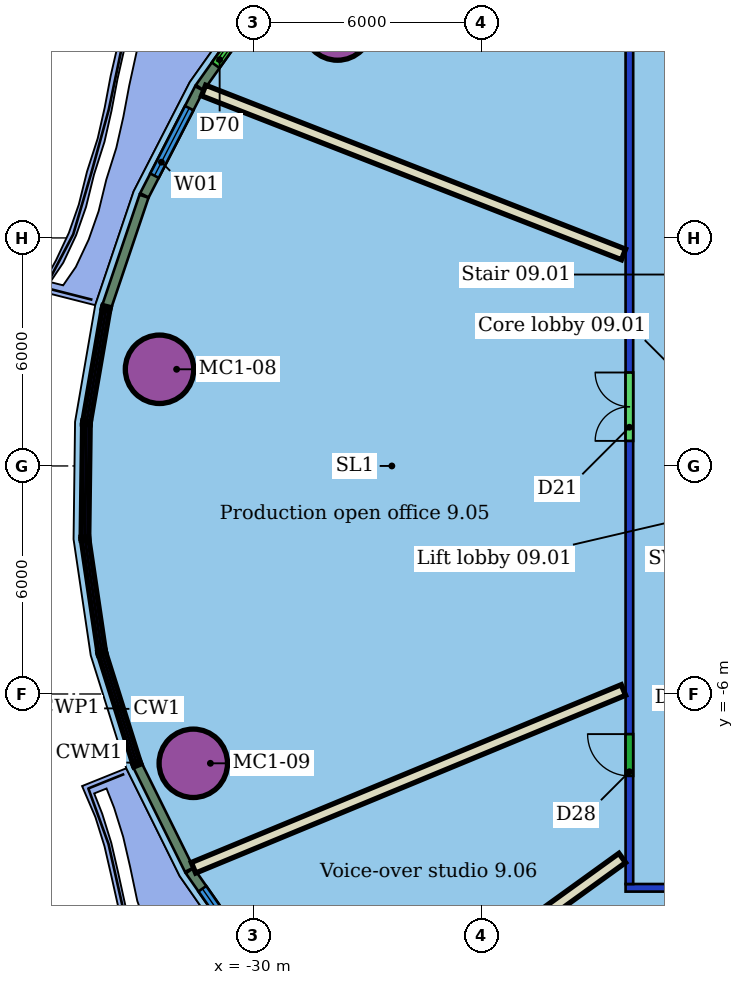
"""IFC4 building model, lengths in metres.
Left out: names, types, materials, properties, quantities, classifications, styles, units other than length and angle.
Written with IfcOpenShell. Run it as: python <this file> out.ifc"""

import sys

from ifc_helpers import new_model, si_unit, direction, frame, frame_2d, origin, origin_2d, place, context, subcontext, project, spatial, rectangle, hollow_circle, extrude, element, fill, save


model = new_model("IFC4")
c1 = context("Model", 3, precision=1e-05, world=origin(), true_north=direction((0.0, 1.0)))
c2 = subcontext(c1, "Body", "Model", "MODEL_VIEW")
j1 = project(units=[si_unit("LENGTHUNIT", "METRE"), si_unit("PLANEANGLEUNIT", "RADIAN")], contexts=[c1])
p1 = place(None, origin())
s1 = spatial("IfcSite", under=j1, at=p1, CompositionType="ELEMENT")
p2 = place(p1, origin())
s2 = spatial("IfcBuilding", under=s1, at=p2, CompositionType="ELEMENT")
p3 = place(p2, frame((0.0, 0.0, 50.8)))
s3 = spatial("IfcBuildingStorey", under=s2, at=p3, CompositionType="ELEMENT", Elevation=50.8)
for number, where, z_axis, x_axis in (
    (1, (-27.78, 11.576, 0.0), (0.0, 0.0, 1.0), (1.0, 0.0, 0.0)),
    (2, (-32.464, 2.543, 0.0), (0.0, 0.0, 1.0), (1.0, 0.0, 0.0)),
    (3, (-31.575, -7.824, 0.0), (0.0, 0.0, 1.0), (1.0, 0.0, 0.0)),
):
    element("IfcColumn", number, at=place(p3, frame(where, z_axis=z_axis, x_axis=x_axis)), inside=s3, PredefinedType="COLUMN", context=c2, shape_type="SweptSolid", body=[
        extrude(hollow_circle(Radius=0.9, WallThickness=0.06, at=origin_2d()), origin(), (0.0, 0.0, 1.0), 3.55),
    ])
p4 = place(p3, frame((8.2, -11.1, 0.0), z_axis=(0.0, 0.0, 1.0), x_axis=(-1.0, 0.0, 0.0)))
e4 = element("IfcWall", 4, at=p4, inside=s3, PredefinedType="PARTITIONING", context=c2, shape_type="SweptSolid", body=[
    extrude(rectangle(XDim=28.4, YDim=0.2, at=frame_2d((14.2, 0.0))), origin(), (0.0, 0.0, 1.0), 2.85),
])
p5 = place(p4, frame((24.814, 0.0, 0.0)))
e5 = element("IfcOpeningElement", 5, at=p5, cuts=e4, PredefinedType="OPENING", context=c2, shape_type="SweptSolid", body=[
    extrude(rectangle(XDim=1.0, YDim=2.1, at=frame_2d((0.5, 1.05))), frame((0.0, 0.11, 0.0), z_axis=(0.0, -1.0, 0.0), x_axis=(1.0, 0.0, 0.0)), (0.0, 0.0, 1.0), 0.22),
])
p6 = place(p4, frame((18.447, 0.0, 0.0)))
e6 = element("IfcOpeningElement", 6, at=p6, cuts=e4, PredefinedType="OPENING", context=c2, shape_type="SweptSolid", body=[
    extrude(rectangle(XDim=1.8, YDim=2.1, at=frame_2d((0.9, 1.05))), frame((0.0, 0.11, 0.0), z_axis=(0.0, -1.0, 0.0), x_axis=(1.0, 0.0, 0.0)), (0.0, 0.0, 1.0), 0.22),
])
p7 = place(p4, frame((7.966, 0.0, 0.0)))
e7 = element("IfcOpeningElement", 7, at=p7, cuts=e4, PredefinedType="OPENING", context=c2, shape_type="SweptSolid", body=[
    extrude(rectangle(XDim=0.9, YDim=2.1, at=frame_2d((0.45, 1.05))), frame((0.0, 0.11, 0.0), z_axis=(0.0, -1.0, 0.0), x_axis=(1.0, 0.0, 0.0)), (0.0, 0.0, 1.0), 0.22),
])
p8 = place(p3, frame((-20.1, -11.0, 0.0), z_axis=(0.0, 0.0, 1.0), x_axis=(0.0, 1.0, 0.0)))
e8 = element("IfcWall", 8, at=p8, inside=s3, PredefinedType="PARTITIONING", context=c2, shape_type="SweptSolid", body=[
    extrude(rectangle(XDim=22.0, YDim=0.2, at=frame_2d((11.0, 0.0))), origin(), (0.0, 0.0, 1.0), 2.85),
])
p9 = place(p8, frame((11.659, 0.0, 0.0)))
e9 = element("IfcOpeningElement", 9, at=p9, cuts=e8, PredefinedType="OPENING", context=c2, shape_type="SweptSolid", body=[
    extrude(rectangle(XDim=1.8, YDim=2.1, at=frame_2d((0.9, 1.05))), frame((0.0, 0.11, 0.0), z_axis=(0.0, -1.0, 0.0), x_axis=(1.0, 0.0, 0.0)), (0.0, 0.0, 1.0), 0.22),
])
p10 = place(p8, frame((2.844, 0.0, 0.0)))
e10 = element("IfcOpeningElement", 10, at=p10, cuts=e8, PredefinedType="OPENING", context=c2, shape_type="SweptSolid", body=[
    extrude(rectangle(XDim=1.1, YDim=2.1, at=frame_2d((0.55, 1.05))), frame((0.0, 0.11, 0.0), z_axis=(0.0, -1.0, 0.0), x_axis=(1.0, 0.0, 0.0)), (0.0, 0.0, 1.0), 0.22),
])
p11 = place(p3, frame((-31.304, 9.879, 0.0), z_axis=(0.0, 0.0, 1.0), x_axis=(0.931524907104, -0.363677532225, 0.0)))
e11 = element("IfcWall", 11, at=p11, inside=s3, PredefinedType="PARTITIONING", context=c2, shape_type="SweptSolid", body=[
    extrude(rectangle(XDim=11.862, YDim=0.3, at=frame_2d((5.931, 0.0))), origin(), (0.0, 0.0, 1.0), 3.55),
])
p12 = place(p3, frame((-31.569, -10.573, 0.0), z_axis=(0.0, 0.0, 1.0), x_axis=(0.924113266053, 0.382118661551, 0.0)))
e12 = element("IfcWall", 12, at=p12, inside=s3, PredefinedType="PARTITIONING", context=c2, shape_type="SweptSolid", body=[
    extrude(rectangle(XDim=12.241, YDim=0.3, at=frame_2d((6.121, 0.0))), origin(), (0.0, 0.0, 1.0), 3.55),
])
p13 = place(p3, frame((-27.538, -15.549, 0.0), z_axis=(0.0, 0.0, 1.0), x_axis=(0.810780725644, 0.585349993528, 0.0)))
e13 = element("IfcWall", 13, at=p13, inside=s3, PredefinedType="PARTITIONING", context=c2, shape_type="SweptSolid", body=[
    extrude(rectangle(XDim=8.942, YDim=0.3, at=frame_2d((4.471, 0.0))), origin(), (0.0, 0.0, 1.0), 3.55),
])
p14 = place(p3, frame((-22.032, -19.475, 0.0), z_axis=(0.0, 0.0, 1.0), x_axis=(0.635562171799, 0.772049691262, 0.0)))
e14 = element("IfcWall", 14, at=p14, inside=s3, PredefinedType="PARTITIONING", context=c2, shape_type="SweptSolid", body=[
    extrude(rectangle(XDim=10.677, YDim=0.1, at=frame_2d((5.338, 0.0))), origin(), (0.0, 0.0, 1.0), 3.55),
])
p15 = place(p3, frame((-29.527, 12.6, 0.0), z_axis=(0.0, 0.0, 1.0), x_axis=(-0.578643660536, -0.81558047679, 0.0)))
e15 = element("IfcWall", 15, at=p15, inside=s3, PredefinedType="SOLIDWALL", context=c2, shape_type="SweptSolid", body=[
    extrude(rectangle(XDim=3.244, YDim=0.25, at=frame_2d((1.622, 0.0))), origin(), (0.0, 0.0, 1.0), 3.15),
])
p16 = place(p15, frame((0.722, 0.0, 0.0)))
e16 = element("IfcOpeningElement", 16, at=p16, cuts=e15, PredefinedType="OPENING", context=c2, shape_type="SweptSolid", body=[
    extrude(rectangle(XDim=1.8, YDim=2.4, at=frame_2d((0.9, 1.2))), frame((0.0, 0.135, 0.0), z_axis=(0.0, -1.0, 0.0), x_axis=(1.0, 0.0, 0.0)), (0.0, 0.0, 1.0), 0.27),
])
p17 = place(p3, frame((-31.417, 9.932, 0.0), z_axis=(0.0, 0.0, 1.0), x_axis=(-0.457105364661, -0.889412550844, 0.0)))
e17 = element("IfcWall", 17, at=p17, inside=s3, PredefinedType="SOLIDWALL", context=c2, shape_type="SweptSolid", body=[
    extrude(rectangle(XDim=3.16, YDim=0.25, at=frame_2d((1.58, 0.0))), origin(), (0.0, 0.0, 1.0), 3.15),
])
p18 = place(p17, frame((0.58, 0.0, 0.8)))
e18 = element("IfcOpeningElement", 18, at=p18, cuts=e17, PredefinedType="OPENING", context=c2, shape_type="SweptSolid", body=[
    extrude(rectangle(XDim=2.0, YDim=2.2, at=frame_2d((1.0, 1.1))), frame((0.0, 0.135, 0.0), z_axis=(0.0, -1.0, 0.0), x_axis=(1.0, 0.0, 0.0)), (0.0, 0.0, 1.0), 0.27),
])
p19 = place(p3, frame((-32.872, 7.097, 0.0), z_axis=(0.0, 0.0, 1.0), x_axis=(-0.319948454673, -0.947434950987, 0.0)))
e19 = element("IfcWall", 19, at=p19, inside=s3, PredefinedType="SOLIDWALL", context=c2, shape_type="SweptSolid", body=[
    extrude(rectangle(XDim=3.049, YDim=0.25, at=frame_2d((1.525, 0.0))), origin(), (0.0, 0.0, 1.0), 3.15),
])
p20 = place(p3, frame((-33.036, -7.892, 0.0), z_axis=(0.0, 0.0, 1.0), x_axis=(0.443751201737, -0.896150027036, 0.0)))
e20 = element("IfcWall", 20, at=p20, inside=s3, PredefinedType="SOLIDWALL", context=c2, shape_type="SweptSolid", body=[
    extrude(rectangle(XDim=3.049, YDim=0.25, at=frame_2d((1.524, 0.0))), origin(), (0.0, 0.0, 1.0), 3.15),
])
p21 = place(p3, frame((-31.669, -10.647, 0.0), z_axis=(0.0, 0.0, 1.0), x_axis=(0.571854103807, -0.820355340056, 0.0)))
e21 = element("IfcWall", 21, at=p21, inside=s3, PredefinedType="SOLIDWALL", context=c2, shape_type="SweptSolid", body=[
    extrude(rectangle(XDim=3.161, YDim=0.25, at=frame_2d((1.58, 0.0))), origin(), (0.0, 0.0, 1.0), 3.15),
])
p22 = place(p21, frame((0.58, 0.0, 0.8)))
e22 = element("IfcOpeningElement", 22, at=p22, cuts=e21, PredefinedType="OPENING", context=c2, shape_type="SweptSolid", body=[
    extrude(rectangle(XDim=2.0, YDim=2.2, at=frame_2d((1.0, 1.1))), frame((0.0, 0.135, 0.0), z_axis=(0.0, -1.0, 0.0), x_axis=(1.0, 0.0, 0.0)), (0.0, 0.0, 1.0), 0.27),
])
p23 = place(p9, origin())
e23 = element("IfcDoor", 23, at=p23, inside=s3, OperationType="DOUBLE_DOOR_SINGLE_SWING", PredefinedType="DOOR", context=c2, shape_type="SweptSolid", body=[
    extrude(rectangle(XDim=1.8, YDim=2.1, at=frame_2d((0.9, 1.05))), frame((0.0, 0.025, 0.0), z_axis=(0.0, -1.0, 0.0), x_axis=(1.0, 0.0, 0.0)), (0.0, 0.0, 1.0), 0.05),
])
fill(e9, e23)
p24 = place(p10, origin())
e24 = element("IfcDoor", 24, at=p24, inside=s3, OperationType="SINGLE_SWING_RIGHT", PredefinedType="DOOR", context=c2, shape_type="SweptSolid", body=[
    extrude(rectangle(XDim=1.1, YDim=2.1, at=frame_2d((0.55, 1.05))), frame((0.0, 0.025, 0.0), z_axis=(0.0, -1.0, 0.0), x_axis=(1.0, 0.0, 0.0)), (0.0, 0.0, 1.0), 0.05),
])
fill(e10, e24)
p25 = place(p16, origin())
e25 = element("IfcDoor", 25, at=p25, inside=s3, OperationType="DOUBLE_DOOR_SLIDING", PredefinedType="DOOR", context=c2, shape_type="SweptSolid", body=[
    extrude(rectangle(XDim=1.8, YDim=2.4, at=frame_2d((0.9, 1.2))), frame((0.0, 0.025, 0.0), z_axis=(0.0, -1.0, 0.0), x_axis=(1.0, 0.0, 0.0)), (0.0, 0.0, 1.0), 0.05),
])
fill(e16, e25)
p26 = place(p18, origin())
e26 = element("IfcWindow", 26, at=p26, inside=s3, PartitioningType="SINGLE_PANEL", PredefinedType="WINDOW", context=c2, shape_type="SweptSolid", body=[
    extrude(rectangle(XDim=2.0, YDim=2.2, at=frame_2d((1.0, 1.1))), frame((0.0, 0.03, 0.0), z_axis=(0.0, -1.0, 0.0), x_axis=(1.0, 0.0, 0.0)), (0.0, 0.0, 1.0), 0.06),
])
fill(e18, e26)
p27 = place(p22, origin())
e27 = element("IfcWindow", 27, at=p27, inside=s3, PartitioningType="SINGLE_PANEL", PredefinedType="WINDOW", context=c2, shape_type="SweptSolid", body=[
    extrude(rectangle(XDim=2.0, YDim=2.2, at=frame_2d((1.0, 1.1))), frame((0.0, 0.03, 0.0), z_axis=(0.0, -1.0, 0.0), x_axis=(1.0, 0.0, 0.0)), (0.0, 0.0, 1.0), 0.06),
])
fill(e22, e27)
save(model, sys.argv[1])
